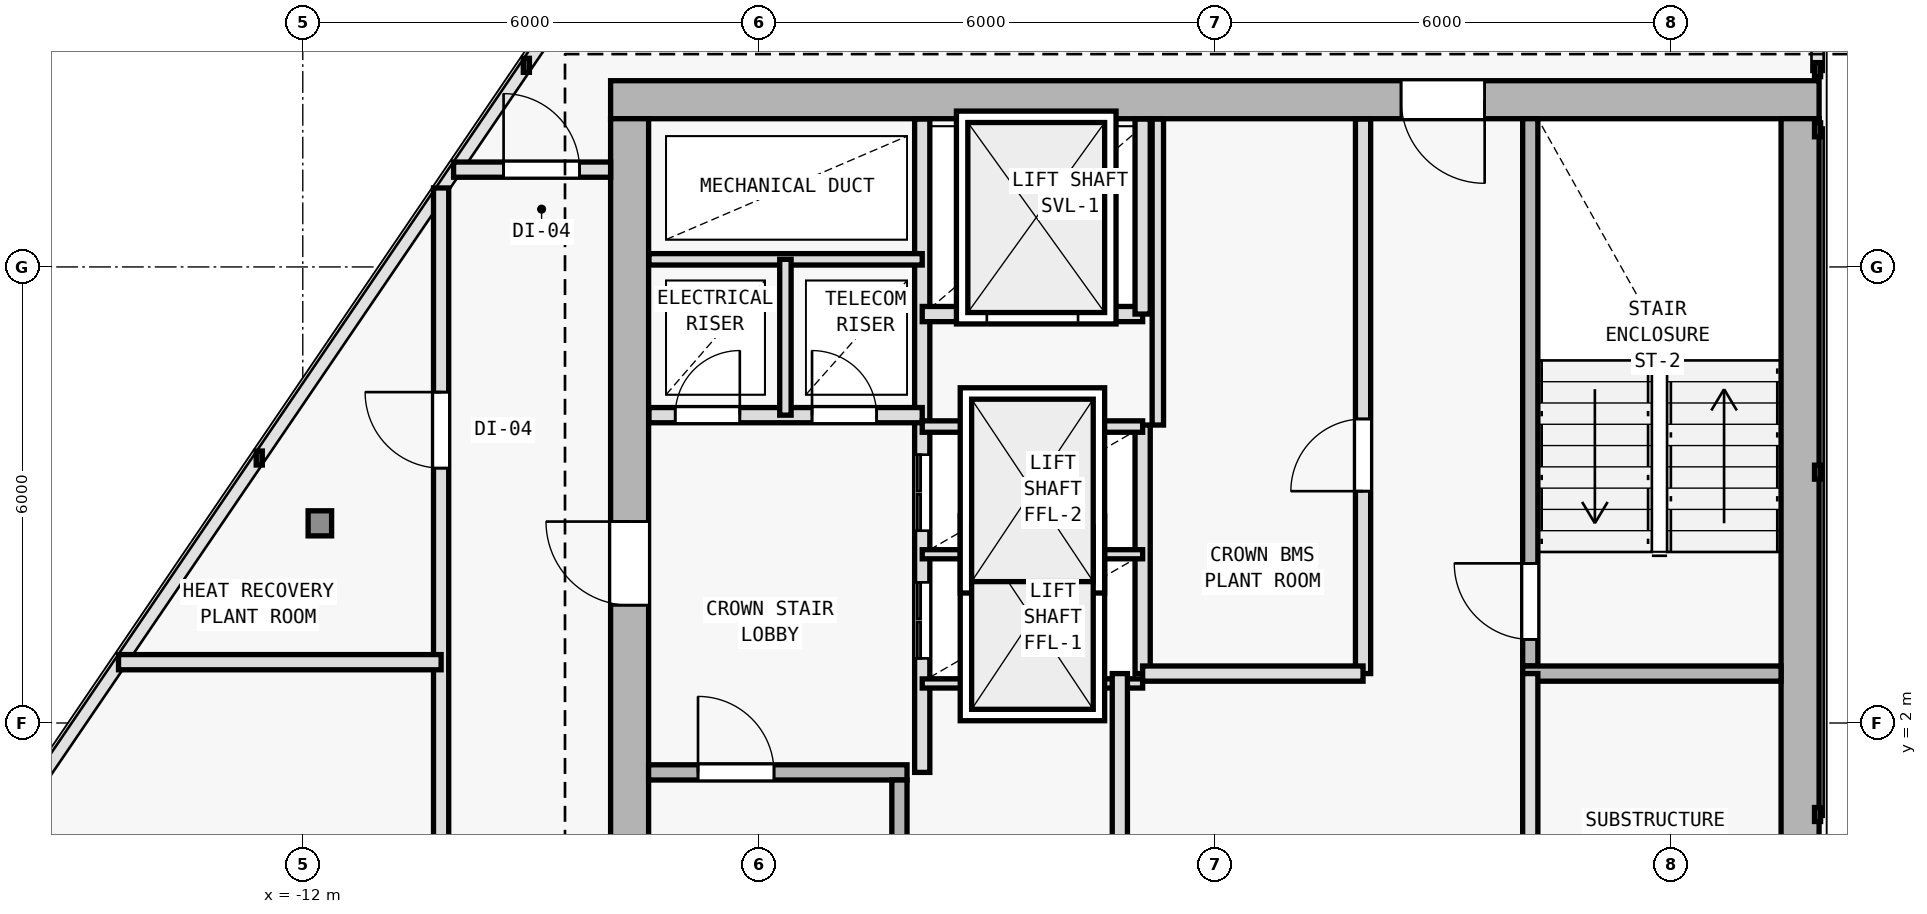
"""IFC4 building model, lengths in metres.
Left out: names, types, materials, properties, quantities, classifications, styles, units other than length and angle.
Written with IfcOpenShell. Run it as: python <this file> out.ifc"""

import sys

from ifc_helpers import new_model, si_unit, direction, frame, frame_2d, origin, origin_2d, place, context, subcontext, project, spatial, rectangle, i_section, extrude, element, fill, save


model = new_model("IFC4")
c1 = context("Model", 3, precision=1e-05, world=origin(), true_north=direction((0.0, 1.0)))
c2 = subcontext(c1, "Body", "Model", "MODEL_VIEW")
j1 = project(units=[si_unit("LENGTHUNIT", "METRE"), si_unit("PLANEANGLEUNIT", "RADIAN")], contexts=[c1])
p1 = place(None, origin())
s1 = spatial("IfcSite", under=j1, at=p1, CompositionType="ELEMENT")
p2 = place(p1, origin())
s2 = spatial("IfcBuilding", under=s1, at=p2, CompositionType="ELEMENT")
p3 = place(p2, frame((0.0, 0.0, 301.2)))
s3 = spatial("IfcBuildingStorey", under=s2, at=p3, CompositionType="ELEMENT", Elevation=301.2)
for number, where, z_axis, x_axis in (
    (1, (7.7, 10.2, 0.0), (0.0, 0.0, 1.0), (1.0, 0.0, 0.0)),
    (2, (-7.7, 10.2, 0.0), (0.0, 0.0, 1.0), (1.0, 0.0, 0.0)),
    (3, (7.7, 0.4, 0.0), (0.0, 0.0, 1.0), (1.0, 0.0, 0.0)),
    (4, (-7.7, 2.0, 0.0), (0.0, 0.0, 1.0), (1.0, 0.0, 0.0)),
):
    element("IfcColumn", number, at=place(p3, frame(where, z_axis=z_axis, x_axis=x_axis)), inside=s3, PredefinedType="COLUMN", context=c2, shape_type="SweptSolid", body=[
        extrude(i_section(OverallWidth=0.374, OverallDepth=0.372, WebThickness=0.012, FlangeThickness=0.02, FilletRadius=0.015, at=origin_2d()), origin(), (0.0, 0.0, 1.0), 3.6),
    ])
p4 = place(p3, frame((-11.775, 4.627, 0.0), z_axis=(0.0, 0.0, 1.0), x_axis=(1.0, 0.0, 0.0)))
e5 = element("IfcColumn", 5, at=p4, inside=s3, PredefinedType="COLUMN", context=c2, shape_type="SweptSolid", body=[
    extrude(i_section(OverallWidth=0.309, OverallDepth=0.33, WebThickness=0.011, FlangeThickness=0.019, FilletRadius=0.027, at=origin_2d()), origin(), (0.0, 0.0, 1.0), 3.6),
])
p5 = place(p3, frame((7.95, 10.2, 0.0), z_axis=(0.0, 0.0, 1.0), x_axis=(-1.0, 0.0, 0.0)))
e6 = element("IfcWall", 6, at=p5, inside=s3, PredefinedType="SHEAR", context=c2, shape_type="SweptSolid", body=[
    extrude(rectangle(XDim=15.9, YDim=0.5, at=frame_2d((7.95, 0.0))), origin(), (0.0, 0.0, 1.0), 3.34),
])
p6 = place(p5, frame((4.4, 0.0, 0.0)))
e7 = element("IfcOpeningElement", 7, at=p6, cuts=e6, PredefinedType="OPENING", context=c2, shape_type="SweptSolid", body=[
    extrude(rectangle(XDim=1.1, YDim=2.15, at=frame_2d((0.55, 1.075))), frame((0.0, 0.26, 0.0), z_axis=(0.0, -1.0, 0.0), x_axis=(1.0, 0.0, 0.0)), (0.0, 0.0, 1.0), 0.52),
])
p7 = place(p3, frame((-7.7, -9.15, 0.0), z_axis=(0.0, 0.0, 1.0), x_axis=(0.0, 1.0, 0.0)))
e8 = element("IfcWall", 8, at=p7, inside=s3, PredefinedType="SHEAR", context=c2, shape_type="SweptSolid", body=[
    extrude(rectangle(XDim=19.1, YDim=0.5, at=frame_2d((9.55, 0.0))), origin(), (0.0, 0.0, 1.0), 3.34),
])
p8 = place(p7, frame((12.7, 0.0, 0.0)))
e9 = element("IfcOpeningElement", 9, at=p8, cuts=e8, PredefinedType="OPENING", context=c2, shape_type="SweptSolid", body=[
    extrude(rectangle(XDim=1.1, YDim=2.15, at=frame_2d((0.55, 1.075))), frame((0.0, 0.26, 0.0), z_axis=(0.0, -1.0, 0.0), x_axis=(1.0, 0.0, 0.0)), (0.0, 0.0, 1.0), 0.52),
])
p9 = place(p3, frame((7.7, 9.95, 0.0), z_axis=(0.0, 0.0, 1.0), x_axis=(0.0, -1.0, 0.0)))
e10 = element("IfcWall", 10, at=p9, inside=s3, PredefinedType="SHEAR", context=c2, shape_type="SweptSolid", body=[
    extrude(rectangle(XDim=19.1, YDim=0.5, at=frame_2d((9.55, 0.0))), origin(), (0.0, 0.0, 1.0), 3.34),
])
p10 = place(p3, frame((-7.45, 1.35, 0.0), z_axis=(0.0, 0.0, 1.0), x_axis=(1.0, 0.0, 0.0)))
e11 = element("IfcWall", 11, at=p10, inside=s3, PredefinedType="SOLIDWALL", context=c2, shape_type="SweptSolid", body=[
    extrude(rectangle(XDim=3.4, YDim=0.2, at=frame_2d((1.7, 0.0))), origin(), (0.0, 0.0, 1.0), 3.34),
])
p11 = place(p10, frame((0.65, 0.0, 0.0)))
e12 = element("IfcOpeningElement", 12, at=p11, cuts=e11, PredefinedType="OPENING", context=c2, shape_type="SweptSolid", body=[
    extrude(rectangle(XDim=1.0, YDim=2.15, at=frame_2d((0.5, 1.075))), frame((0.0, 0.11, 0.0), z_axis=(0.0, -1.0, 0.0), x_axis=(1.0, 0.0, 0.0)), (0.0, 0.0, 1.0), 0.22),
])
p12 = place(p3, frame((-4.15, -5.95, 0.0), z_axis=(0.0, 0.0, 1.0), x_axis=(0.0, 1.0, 0.0)))
e13 = element("IfcWall", 13, at=p12, inside=s3, PredefinedType="SOLIDWALL", context=c2, shape_type="SweptSolid", body=[
    extrude(rectangle(XDim=7.2, YDim=0.2, at=frame_2d((3.6, 0.0))), origin(), (0.0, 0.0, 1.0), 3.34),
])
p13 = place(p3, frame((-3.85, 1.35, 0.0), z_axis=(0.0, 0.0, 1.0), x_axis=(0.0, 1.0, 0.0)))
e14 = element("IfcWall", 14, at=p13, inside=s3, PredefinedType="SOLIDWALL", context=c2, shape_type="SweptSolid", body=[
    extrude(rectangle(XDim=8.595, YDim=0.2, at=frame_2d((4.297, 0.0))), origin(), (0.0, 0.0, 1.0), 3.34),
])
p14 = place(p13, frame((1.5, 0.0, 0.0)))
e15 = element("IfcOpeningElement", 15, at=p14, cuts=e14, PredefinedType="OPENING", context=c2, shape_type="SweptSolid", body=[
    extrude(rectangle(XDim=1.0, YDim=2.15, at=frame_2d((0.5, 1.075))), frame((0.0, 0.11, 0.0), z_axis=(0.0, -1.0, 0.0), x_axis=(1.0, 0.0, 0.0)), (0.0, 0.0, 1.0), 0.22),
])
p15 = place(p13, frame((3.18, 0.0, 0.0)))
e16 = element("IfcOpeningElement", 16, at=p15, cuts=e14, PredefinedType="OPENING", context=c2, shape_type="SweptSolid", body=[
    extrude(rectangle(XDim=1.0, YDim=2.15, at=frame_2d((0.5, 1.075))), frame((0.0, 0.11, 0.0), z_axis=(0.0, -1.0, 0.0), x_axis=(1.0, 0.0, 0.0)), (0.0, 0.0, 1.0), 0.22),
])
p16 = place(p3, frame((-7.445, 6.05, 0.0), z_axis=(0.0, 0.0, 1.0), x_axis=(1.0, 0.0, 0.0)))
e17 = element("IfcWall", 17, at=p16, inside=s3, PredefinedType="SOLIDWALL", context=c2, shape_type="SweptSolid", body=[
    extrude(rectangle(XDim=3.595, YDim=0.2, at=frame_2d((1.797, 0.0))), origin(), (0.0, 0.0, 1.0), 3.34),
])
p17 = place(p16, frame((0.345, 0.0, 0.0)))
e18 = element("IfcOpeningElement", 18, at=p17, cuts=e17, PredefinedType="OPENING", context=c2, shape_type="SweptSolid", body=[
    extrude(rectangle(XDim=0.85, YDim=2.1, at=frame_2d((0.425, 1.05))), frame((0.0, 0.11, 0.0), z_axis=(0.0, -1.0, 0.0), x_axis=(1.0, 0.0, 0.0)), (0.0, 0.0, 1.0), 0.22),
])
p18 = place(p16, frame((2.145, 0.0, 0.0)))
e19 = element("IfcOpeningElement", 19, at=p18, cuts=e17, PredefinedType="OPENING", context=c2, shape_type="SweptSolid", body=[
    extrude(rectangle(XDim=0.85, YDim=2.1, at=frame_2d((0.425, 1.05))), frame((0.0, 0.11, 0.0), z_axis=(0.0, -1.0, 0.0), x_axis=(1.0, 0.0, 0.0)), (0.0, 0.0, 1.0), 0.22),
])
p19 = place(p3, frame((-7.445, 8.1, 0.0), z_axis=(0.0, 0.0, 1.0), x_axis=(1.0, 0.0, 0.0)))
e20 = element("IfcWall", 20, at=p19, inside=s3, PredefinedType="PARTITIONING", context=c2, shape_type="SweptSolid", body=[
    extrude(rectangle(XDim=3.595, YDim=0.15, at=frame_2d((1.797, 0.0))), origin(), (0.0, 0.0, 1.0), 3.34),
])
p20 = place(p3, frame((-5.65, 6.05, 0.0), z_axis=(0.0, 0.0, 1.0), x_axis=(0.0, 1.0, 0.0)))
e21 = element("IfcWall", 21, at=p20, inside=s3, PredefinedType="PARTITIONING", context=c2, shape_type="SweptSolid", body=[
    extrude(rectangle(XDim=2.05, YDim=0.15, at=frame_2d((1.025, 0.0))), origin(), (0.0, 0.0, 1.0), 3.34),
])
p21 = place(p3, frame((4.15, 2.75, 0.0), z_axis=(0.0, 0.0, 1.0), x_axis=(0.0, 1.0, 0.0)))
e22 = element("IfcWall", 22, at=p21, inside=s3, PredefinedType="SOLIDWALL", context=c2, shape_type="SweptSolid", body=[
    extrude(rectangle(XDim=7.2, YDim=0.2, at=frame_2d((3.6, 0.0))), origin(), (0.0, 0.0, 1.0), 3.34),
])
p22 = place(p21, frame((0.35, 0.0, 0.0)))
e23 = element("IfcOpeningElement", 23, at=p22, cuts=e22, PredefinedType="OPENING", context=c2, shape_type="SweptSolid", body=[
    extrude(rectangle(XDim=1.0, YDim=2.15, at=frame_2d((0.5, 1.075))), frame((0.0, 0.11, 0.0), z_axis=(0.0, -1.0, 0.0), x_axis=(1.0, 0.0, 0.0)), (0.0, 0.0, 1.0), 0.22),
])
p23 = place(p3, frame((4.05, 2.65, 0.0), z_axis=(0.0, 0.0, 1.0), x_axis=(1.0, 0.0, 0.0)))
e24 = element("IfcWall", 24, at=p23, inside=s3, PredefinedType="SOLIDWALL", context=c2, shape_type="SweptSolid", body=[
    extrude(rectangle(XDim=3.4, YDim=0.2, at=frame_2d((1.7, 0.0))), origin(), (0.0, 0.0, 1.0), 3.34),
])
p24 = place(p3, frame((-0.95, 2.65, 0.0), z_axis=(0.0, 0.0, 1.0), x_axis=(0.0, 1.0, 0.0)))
e25 = element("IfcWall", 25, at=p24, inside=s3, PredefinedType="SOLIDWALL", context=c2, shape_type="SweptSolid", body=[
    extrude(rectangle(XDim=3.27, YDim=0.2, at=frame_2d((1.635, 0.0))), origin(), (0.0, 0.0, 1.0), 3.34),
])
for number, where, z_axis, x_axis in (
    (26, (-3.85, 2.52, 0.0), (0.0, 0.0, 1.0), (1.0, 0.0, 0.0)),
    (27, (-3.85, 4.22, 0.0), (0.0, 0.0, 1.0), (1.0, 0.0, 0.0)),
):
    element("IfcWall", number, at=place(p3, frame(where, z_axis=z_axis, x_axis=x_axis)), inside=s3, PredefinedType="PARTITIONING", context=c2, shape_type="SweptSolid", body=[
        extrude(rectangle(XDim=2.9, YDim=0.12, at=frame_2d((1.45, 0.0))), origin(), (0.0, 0.0, 1.0), 3.34),
    ])
p25 = place(p3, frame((-3.85, 5.9, 0.0), z_axis=(0.0, 0.0, 1.0), x_axis=(1.0, 0.0, 0.0)))
e28 = element("IfcWall", 28, at=p25, inside=s3, PredefinedType="PARTITIONING", context=c2, shape_type="SweptSolid", body=[
    extrude(rectangle(XDim=2.9, YDim=0.15, at=frame_2d((1.45, 0.0))), origin(), (0.0, 0.0, 1.0), 3.34),
])
p26 = place(p3, frame((-3.85, 7.38, 0.0), z_axis=(0.0, 0.0, 1.0), x_axis=(1.0, 0.0, 0.0)))
e29 = element("IfcWall", 29, at=p26, inside=s3, PredefinedType="SOLIDWALL", context=c2, shape_type="SweptSolid", body=[
    extrude(rectangle(XDim=2.9, YDim=0.2, at=frame_2d((1.45, 0.0))), origin(), (0.0, 0.0, 1.0), 3.34),
])
p27 = place(p26, frame((0.85, 0.0, 0.0)))
e30 = element("IfcOpeningElement", 30, at=p27, cuts=e29, PredefinedType="OPENING", context=c2, shape_type="SweptSolid", body=[
    extrude(rectangle(XDim=1.2, YDim=2.2, at=frame_2d((0.6, 1.1))), frame((0.0, 0.11, 0.0), z_axis=(0.0, -1.0, 0.0), x_axis=(1.0, 0.0, 0.0)), (0.0, 0.0, 1.0), 0.22),
])
p28 = place(p3, frame((-0.95, 7.38, 0.0), z_axis=(0.0, 0.0, 1.0), x_axis=(0.0, 1.0, 0.0)))
e31 = element("IfcWall", 31, at=p28, inside=s3, PredefinedType="SOLIDWALL", context=c2, shape_type="SweptSolid", body=[
    extrude(rectangle(XDim=2.565, YDim=0.2, at=frame_2d((1.283, 0.0))), origin(), (0.0, 0.0, 1.0), 3.34),
])
p29 = place(p3, frame((4.15, -6.05, 0.0), z_axis=(0.0, 0.0, 1.0), x_axis=(0.0, 1.0, 0.0)))
e32 = element("IfcWall", 32, at=p29, inside=s3, PredefinedType="SOLIDWALL", context=c2, shape_type="SweptSolid", body=[
    extrude(rectangle(XDim=8.7, YDim=0.2, at=frame_2d((4.35, 0.0))), origin(), (0.0, 0.0, 1.0), 3.34),
])
p30 = place(p29, frame((3.6, 0.0, 0.0)))
e33 = element("IfcOpeningElement", 33, at=p30, cuts=e32, PredefinedType="OPENING", context=c2, shape_type="SweptSolid", body=[
    extrude(rectangle(XDim=0.95, YDim=2.1, at=frame_2d((0.475, 1.05))), frame((0.0, 0.11, 0.0), z_axis=(0.0, -1.0, 0.0), x_axis=(1.0, 0.0, 0.0)), (0.0, 0.0, 1.0), 0.22),
])
p31 = place(p3, frame((-1.25, -6.05, 0.0), z_axis=(0.0, 0.0, 1.0), x_axis=(0.0, 1.0, 0.0)))
e34 = element("IfcWall", 34, at=p31, inside=s3, PredefinedType="SOLIDWALL", context=c2, shape_type="SweptSolid", body=[
    extrude(rectangle(XDim=8.7, YDim=0.2, at=frame_2d((4.35, 0.0))), origin(), (0.0, 0.0, 1.0), 3.34),
])
p32 = place(p31, frame((3.4, 0.0, 0.0)))
e35 = element("IfcOpeningElement", 35, at=p32, cuts=e34, PredefinedType="OPENING", context=c2, shape_type="SweptSolid", body=[
    extrude(rectangle(XDim=0.95, YDim=2.1, at=frame_2d((0.475, 1.05))), frame((0.0, 0.11, 0.0), z_axis=(0.0, -1.0, 0.0), x_axis=(1.0, 0.0, 0.0)), (0.0, 0.0, 1.0), 0.22),
])
p33 = place(p3, frame((1.95, 2.65, 0.0), z_axis=(0.0, 0.0, 1.0), x_axis=(0.0, 1.0, 0.0)))
e36 = element("IfcWall", 36, at=p33, inside=s3, PredefinedType="SOLIDWALL", context=c2, shape_type="SweptSolid", body=[
    extrude(rectangle(XDim=7.295, YDim=0.2, at=frame_2d((3.647, 0.0))), origin(), (0.0, 0.0, 1.0), 3.34),
])
p34 = place(p33, frame((2.4, 0.0, 0.0)))
e37 = element("IfcOpeningElement", 37, at=p34, cuts=e36, PredefinedType="OPENING", context=c2, shape_type="SweptSolid", body=[
    extrude(rectangle(XDim=0.95, YDim=2.1, at=frame_2d((0.475, 1.05))), frame((0.0, 0.11, 0.0), z_axis=(0.0, -1.0, 0.0), x_axis=(1.0, 0.0, 0.0)), (0.0, 0.0, 1.0), 0.22),
])
p35 = place(p3, frame((-0.95, 2.65, 0.0), z_axis=(0.0, 0.0, 1.0), x_axis=(1.0, 0.0, 0.0)))
e38 = element("IfcWall", 38, at=p35, inside=s3, PredefinedType="SOLIDWALL", context=c2, shape_type="SweptSolid", body=[
    extrude(rectangle(XDim=2.9, YDim=0.2, at=frame_2d((1.45, 0.0))), origin(), (0.0, 0.0, 1.0), 3.34),
])
p36 = place(p3, frame((-0.75, 5.92, 0.0), z_axis=(0.0, 0.0, 1.0), x_axis=(0.0, 1.0, 0.0)))
e39 = element("IfcWall", 39, at=p36, inside=s3, PredefinedType="PARTITIONING", context=c2, shape_type="SweptSolid", body=[
    extrude(rectangle(XDim=4.025, YDim=0.15, at=frame_2d((2.013, 0.0))), origin(), (0.0, 0.0, 1.0), 3.34),
])
p37 = place(p3, frame((-10.18, -11.68, 0.0), z_axis=(0.0, 0.0, 1.0), x_axis=(0.0, 1.0, 0.0)))
e40 = element("IfcWall", 40, at=p37, inside=s3, PredefinedType="SOLIDWALL", context=c2, shape_type="SweptSolid", body=[
    extrude(rectangle(XDim=20.719, YDim=0.2, at=frame_2d((10.359, 0.0))), origin(), (0.0, 0.0, 1.0), 2.995),
])
p38 = place(p37, frame((10.48, 0.0, 0.0)))
e41 = element("IfcOpeningElement", 41, at=p38, cuts=e40, PredefinedType="OPENING", context=c2, shape_type="SweptSolid", body=[
    extrude(rectangle(XDim=1.0, YDim=2.15, at=frame_2d((0.5, 1.075))), frame((0.0, 0.11, 0.0), z_axis=(0.0, -1.0, 0.0), x_axis=(1.0, 0.0, 0.0)), (0.0, 0.0, 1.0), 0.22),
])
p39 = place(p37, frame((17.033, 0.0, 0.0)))
e42 = element("IfcOpeningElement", 42, at=p39, cuts=e40, PredefinedType="OPENING", context=c2, shape_type="SweptSolid", body=[
    extrude(rectangle(XDim=1.0, YDim=2.15, at=frame_2d((0.5, 1.075))), frame((0.0, 0.11, 0.0), z_axis=(0.0, -1.0, 0.0), x_axis=(1.0, 0.0, 0.0)), (0.0, 0.0, 1.0), 0.22),
])
p40 = place(p3, frame((-10.016, 9.28, 0.0), z_axis=(0.0, 0.0, 1.0), x_axis=(1.0, 0.0, 0.0)))
e43 = element("IfcWall", 43, at=p40, inside=s3, PredefinedType="SOLIDWALL", context=c2, shape_type="SweptSolid", body=[
    extrude(rectangle(XDim=2.066, YDim=0.2, at=frame_2d((1.033, 0.0))), origin(), (0.0, 0.0, 1.0), 3.34),
])
p41 = place(p40, frame((0.658, 0.0, 0.0)))
e44 = element("IfcOpeningElement", 44, at=p41, cuts=e43, PredefinedType="OPENING", context=c2, shape_type="SweptSolid", body=[
    extrude(rectangle(XDim=1.0, YDim=2.15, at=frame_2d((0.5, 1.075))), frame((0.0, 0.11, 0.0), z_axis=(0.0, -1.0, 0.0), x_axis=(1.0, 0.0, 0.0)), (0.0, 0.0, 1.0), 0.22),
])
p42 = place(p3, frame((-14.424, 2.8, 0.0), z_axis=(0.0, 0.0, 1.0), x_axis=(1.0, 0.0, 0.0)))
e45 = element("IfcWall", 45, at=p42, inside=s3, PredefinedType="SOLIDWALL", context=c2, shape_type="SweptSolid", body=[
    extrude(rectangle(XDim=4.244, YDim=0.2, at=frame_2d((2.122, 0.0))), origin(), (0.0, 0.0, 1.0), 3.34),
])
p43 = place(p8, origin())
e46 = element("IfcDoor", 46, at=p43, inside=s3, OperationType="SINGLE_SWING_RIGHT", PredefinedType="DOOR", context=c2, shape_type="SweptSolid", body=[
    extrude(rectangle(XDim=1.1, YDim=2.15, at=frame_2d((0.55, 1.075))), frame((0.0, 0.025, 0.0), z_axis=(0.0, -1.0, 0.0), x_axis=(1.0, 0.0, 0.0)), (0.0, 0.0, 1.0), 0.05),
])
fill(e9, e46)
p44 = place(p6, origin())
e47 = element("IfcDoor", 47, at=p44, inside=s3, OperationType="SINGLE_SWING_LEFT", PredefinedType="DOOR", context=c2, shape_type="SweptSolid", body=[
    extrude(rectangle(XDim=1.1, YDim=2.15, at=frame_2d((0.55, 1.075))), frame((0.0, 0.025, 0.0), z_axis=(0.0, -1.0, 0.0), x_axis=(1.0, 0.0, 0.0)), (0.0, 0.0, 1.0), 0.05),
])
fill(e7, e47)
p45 = place(p11, origin())
e48 = element("IfcDoor", 48, at=p45, inside=s3, OperationType="SINGLE_SWING_LEFT", PredefinedType="DOOR", context=c2, shape_type="SweptSolid", body=[
    extrude(rectangle(XDim=1.0, YDim=2.15, at=frame_2d((0.5, 1.075))), frame((0.0, 0.025, 0.0), z_axis=(0.0, -1.0, 0.0), x_axis=(1.0, 0.0, 0.0)), (0.0, 0.0, 1.0), 0.05),
])
fill(e12, e48)
p46 = place(p17, origin())
e49 = element("IfcDoor", 49, at=p46, inside=s3, OperationType="SINGLE_SWING_RIGHT", PredefinedType="DOOR", context=c2, shape_type="SweptSolid", body=[
    extrude(rectangle(XDim=0.85, YDim=2.1, at=frame_2d((0.425, 1.05))), frame((0.0, 0.025, 0.0), z_axis=(0.0, -1.0, 0.0), x_axis=(1.0, 0.0, 0.0)), (0.0, 0.0, 1.0), 0.05),
])
fill(e18, e49)
p47 = place(p18, origin())
e50 = element("IfcDoor", 50, at=p47, inside=s3, OperationType="SINGLE_SWING_LEFT", PredefinedType="DOOR", context=c2, shape_type="SweptSolid", body=[
    extrude(rectangle(XDim=0.85, YDim=2.1, at=frame_2d((0.425, 1.05))), frame((0.0, 0.025, 0.0), z_axis=(0.0, -1.0, 0.0), x_axis=(1.0, 0.0, 0.0)), (0.0, 0.0, 1.0), 0.05),
])
fill(e19, e50)
p48 = place(p22, origin())
e51 = element("IfcDoor", 51, at=p48, inside=s3, OperationType="SINGLE_SWING_RIGHT", PredefinedType="DOOR", context=c2, shape_type="SweptSolid", body=[
    extrude(rectangle(XDim=1.0, YDim=2.15, at=frame_2d((0.5, 1.075))), frame((0.0, 0.025, 0.0), z_axis=(0.0, -1.0, 0.0), x_axis=(1.0, 0.0, 0.0)), (0.0, 0.0, 1.0), 0.05),
])
fill(e23, e51)
p49 = place(p27, origin())
e52 = element("IfcDoor", 52, at=p49, inside=s3, OperationType="DOUBLE_DOOR_SLIDING", PredefinedType="DOOR", context=c2, shape_type="SweptSolid", body=[
    extrude(rectangle(XDim=1.2, YDim=2.2, at=frame_2d((0.6, 1.1))), frame((0.0, 0.025, 0.0), z_axis=(0.0, -1.0, 0.0), x_axis=(1.0, 0.0, 0.0)), (0.0, 0.0, 1.0), 0.05),
])
fill(e30, e52)
p50 = place(p34, origin())
e53 = element("IfcDoor", 53, at=p50, inside=s3, OperationType="SINGLE_SWING_LEFT", PredefinedType="DOOR", context=c2, shape_type="SweptSolid", body=[
    extrude(rectangle(XDim=0.95, YDim=2.1, at=frame_2d((0.475, 1.05))), frame((0.0, 0.025, 0.0), z_axis=(0.0, -1.0, 0.0), x_axis=(1.0, 0.0, 0.0)), (0.0, 0.0, 1.0), 0.05),
])
fill(e37, e53)
p51 = place(p14, origin())
e54 = element("IfcDoor", 54, at=p51, inside=s3, OperationType="DOUBLE_DOOR_SLIDING", PredefinedType="DOOR", context=c2, shape_type="SweptSolid", body=[
    extrude(rectangle(XDim=1.0, YDim=2.15, at=frame_2d((0.5, 1.075))), frame((0.0, 0.025, 0.0), z_axis=(0.0, -1.0, 0.0), x_axis=(1.0, 0.0, 0.0)), (0.0, 0.0, 1.0), 0.05),
])
fill(e15, e54)
p52 = place(p15, origin())
e55 = element("IfcDoor", 55, at=p52, inside=s3, OperationType="DOUBLE_DOOR_SLIDING", PredefinedType="DOOR", context=c2, shape_type="SweptSolid", body=[
    extrude(rectangle(XDim=1.0, YDim=2.15, at=frame_2d((0.5, 1.075))), frame((0.0, 0.025, 0.0), z_axis=(0.0, -1.0, 0.0), x_axis=(1.0, 0.0, 0.0)), (0.0, 0.0, 1.0), 0.05),
])
fill(e16, e55)
p53 = place(p41, origin())
e56 = element("IfcDoor", 56, at=p53, inside=s3, OperationType="SINGLE_SWING_LEFT", PredefinedType="DOOR", context=c2, shape_type="SweptSolid", body=[
    extrude(rectangle(XDim=1.0, YDim=2.15, at=frame_2d((0.5, 1.075))), frame((0.0, 0.025, 0.0), z_axis=(0.0, -1.0, 0.0), x_axis=(1.0, 0.0, 0.0)), (0.0, 0.0, 1.0), 0.05),
])
fill(e44, e56)
p54 = place(p39, origin())
e57 = element("IfcDoor", 57, at=p54, inside=s3, OperationType="SINGLE_SWING_RIGHT", PredefinedType="DOOR", context=c2, shape_type="SweptSolid", body=[
    extrude(rectangle(XDim=1.0, YDim=2.15, at=frame_2d((0.5, 1.075))), frame((0.0, 0.025, 0.0), z_axis=(0.0, -1.0, 0.0), x_axis=(1.0, 0.0, 0.0)), (0.0, 0.0, 1.0), 0.05),
])
fill(e42, e57)
save(model, sys.argv[1])
